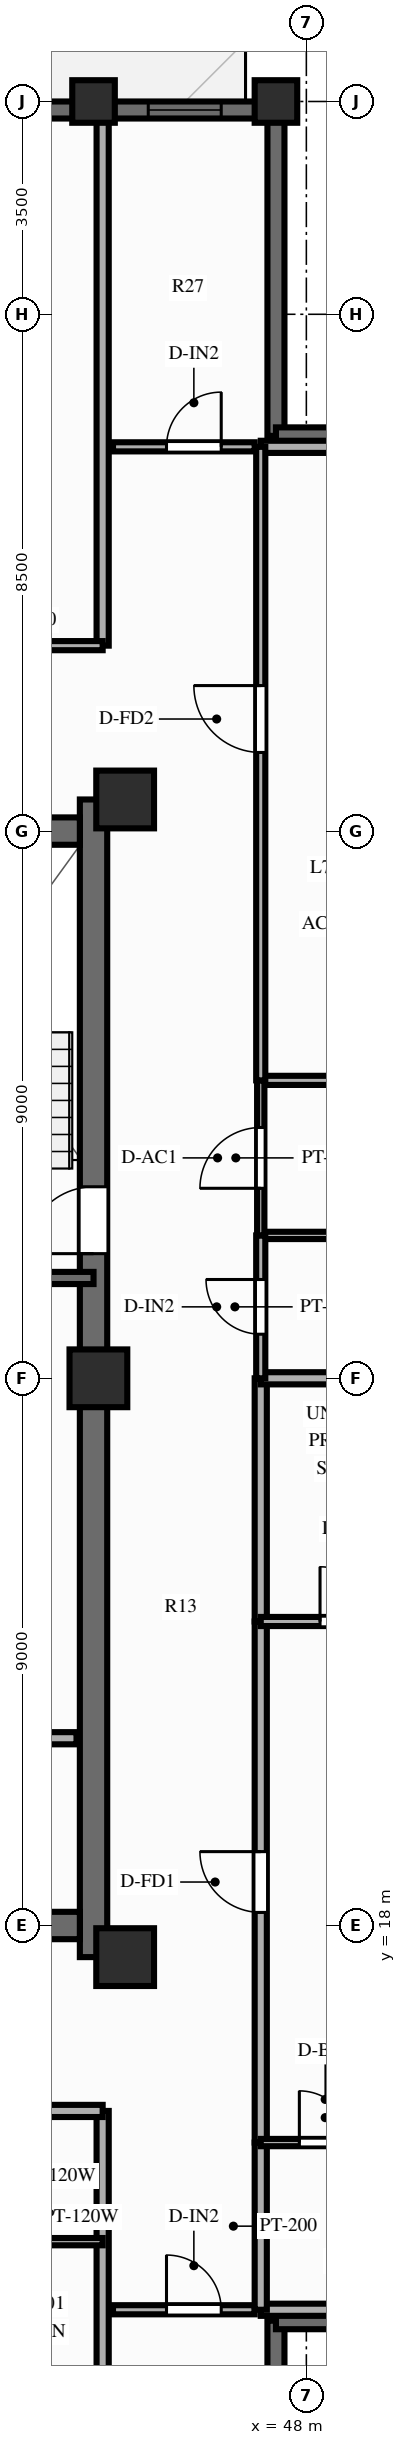
"""IFC4 building model, lengths in metres.
Left out: names, types, materials, properties, quantities, classifications, styles, units other than length and angle.
Written with IfcOpenShell. Run it as: python <this file> out.ifc"""

import sys

from ifc_helpers import new_model, si_unit, direction, frame, frame_2d, origin, origin_2d, place, context, subcontext, project, spatial, rectangle, extrude, source, transform, mapped, element, fill, save


model = new_model("IFC4")
c1 = context("Model", 3, precision=1e-05, world=origin(), true_north=direction((0.0, 1.0)))
c2 = subcontext(c1, "Body", "Model", "MODEL_VIEW")
j1 = project(units=[si_unit("LENGTHUNIT", "METRE"), si_unit("PLANEANGLEUNIT", "RADIAN")], contexts=[c1])
p1 = place(None, origin())
s1 = spatial("IfcSite", under=j1, at=p1, CompositionType="ELEMENT")
p2 = place(p1, origin())
s2 = spatial("IfcBuilding", under=s1, at=p2, CompositionType="ELEMENT")
p3 = place(p2, frame((0.0, 0.0, 240.0)))
s3 = spatial("IfcBuildingStorey", under=s2, at=p3, CompositionType="ELEMENT", Elevation=240.0)
p4 = place(p3, frame((44.5, 17.48, 0.0), z_axis=(0.0, 0.0, 1.0), x_axis=(0.0, 1.0, 0.0)))
e1 = element("IfcWall", 1, at=p4, inside=s3, PredefinedType="SHEAR", context=c2, shape_type="SweptSolid", body=[
    extrude(rectangle(XDim=19.04, YDim=0.45, at=frame_2d((9.52, 0.0))), origin(), (0.0, 0.0, 1.0), 3.0),
])
p5 = place(p4, frame((12.67, 0.0, 0.0), z_axis=(0.0, 0.0, 1.0), x_axis=(-1.0, 0.0, 0.0)))
e2 = element("IfcOpeningElement", 2, at=p5, cuts=e1, PredefinedType="OPENING", context=c2, shape_type="SweptSolid", body=[
    extrude(rectangle(XDim=1.1, YDim=2.15, at=frame_2d((0.55, 1.075))), frame((0.0, 0.237, 0.0), z_axis=(0.0, -1.0, 0.0), x_axis=(1.0, 0.0, 0.0)), (0.0, 0.0, 1.0), 0.474),
])
p6 = place(p3, frame((31.725, 18.0, 0.0), z_axis=(0.0, 0.0, 1.0), x_axis=(1.0, 0.0, 0.0)))
e3 = element("IfcWall", 3, at=p6, inside=s3, PredefinedType="SHEAR", context=c2, shape_type="SweptSolid", body=[
    extrude(rectangle(XDim=12.55, YDim=0.45, at=frame_2d((6.275, 0.0))), origin(), (0.0, 0.0, 1.0), 3.0),
])
p7 = place(p3, frame((31.725, 36.0, 0.0), z_axis=(0.0, 0.0, 1.0), x_axis=(1.0, 0.0, 0.0)))
e4 = element("IfcWall", 4, at=p7, inside=s3, PredefinedType="SHEAR", context=c2, shape_type="SweptSolid", body=[
    extrude(rectangle(XDim=12.55, YDim=0.45, at=frame_2d((6.275, 0.0))), origin(), (0.0, 0.0, 1.0), 3.0),
])
p8 = place(p7, frame((5.225, 0.0, 0.0), z_axis=(0.0, 0.0, 1.0), x_axis=(-1.0, 0.0, 0.0)))
e5 = element("IfcOpeningElement", 5, at=p8, cuts=e4, PredefinedType="OPENING", context=c2, shape_type="SweptSolid", body=[
    extrude(rectangle(XDim=1.4, YDim=2.15, at=frame_2d((0.7, 1.075))), frame((0.0, 0.237, 0.0), z_axis=(0.0, -1.0, 0.0), x_axis=(1.0, 0.0, 0.0)), (0.0, 0.0, 1.0), 0.474),
])
m1 = source(origin(), c2, "Body", "SweptSolid", [
    extrude(rectangle(XDim=0.95, YDim=0.95, at=origin_2d()), origin(), (0.0, 0.0, 1.0), 3.0),
])
for number, where, z_axis, x_axis in (
    (6, (45.02, 17.48, 0.0), (0.0, 0.0, 1.0), (1.0, 0.0, 0.0)),
    (7, (45.02, 36.52, 0.0), (0.0, 0.0, 1.0), (1.0, 0.0, 0.0)),
    (8, (44.58, 27.0, 0.0), (0.0, 0.0, 1.0), (1.0, 0.0, 0.0)),
):
    element("IfcColumn", number, at=place(p3, frame(where, z_axis=z_axis, x_axis=x_axis)), inside=s3, PredefinedType="COLUMN", context=c2, shape_type="MappedRepresentation", body=[
        mapped(m1, transform((0.0, 0.0, 0.0), scale=1.0)),
    ])
m2 = source(origin(), c2, "Body", "SweptSolid", [
    extrude(rectangle(XDim=0.7, YDim=0.7, at=origin_2d()), origin(), (0.0, 0.0, 1.0), 3.0),
])
for number, where, z_axis, x_axis in (
    (9, (47.5, 48.0, 0.0), (0.0, 0.0, 1.0), (1.0, 0.0, 0.0)),
    (10, (44.5, 48.0, 0.0), (0.0, 0.0, 1.0), (1.0, 0.0, 0.0)),
):
    element("IfcColumn", number, at=place(p3, frame(where, z_axis=z_axis, x_axis=x_axis)), inside=s3, PredefinedType="COLUMN", context=c2, shape_type="MappedRepresentation", body=[
        mapped(m2, transform((0.0, 0.0, 0.0), scale=1.0)),
    ])
p9 = place(p3, frame((28.5, 47.86, 0.0), z_axis=(0.0, 0.0, 1.0), x_axis=(1.0, 0.0, 0.0)))
e11 = element("IfcWall", 11, at=p9, inside=s3, PredefinedType="SOLIDWALL", context=c2, shape_type="SweptSolid", body=[
    extrude(rectangle(XDim=19.0, YDim=0.28, at=frame_2d((9.5, 0.0))), origin(), (0.0, 0.0, 1.0), 2.28),
])
p10 = place(p9, frame((0.9, 0.0, 0.25)))
e12 = element("IfcOpeningElement", 12, at=p10, cuts=e11, PredefinedType="OPENING", context=c2, shape_type="SweptSolid", body=[
    extrude(rectangle(XDim=1.2, YDim=1.5, at=frame_2d((0.6, 0.75))), frame((0.0, 0.152, 0.0), z_axis=(0.0, -1.0, 0.0), x_axis=(1.0, 0.0, 0.0)), (0.0, 0.0, 1.0), 0.304),
])
p11 = place(p9, frame((3.62, 0.0, 0.25)))
e13 = element("IfcOpeningElement", 13, at=p11, cuts=e11, PredefinedType="OPENING", context=c2, shape_type="SweptSolid", body=[
    extrude(rectangle(XDim=0.95, YDim=1.5, at=frame_2d((0.475, 0.75))), frame((0.0, 0.152, 0.0), z_axis=(0.0, -1.0, 0.0), x_axis=(1.0, 0.0, 0.0)), (0.0, 0.0, 1.0), 0.304),
])
p12 = place(p9, frame((5.682, 0.0, 0.25)))
e14 = element("IfcOpeningElement", 14, at=p12, cuts=e11, PredefinedType="OPENING", context=c2, shape_type="SweptSolid", body=[
    extrude(rectangle(XDim=1.2, YDim=1.5, at=frame_2d((0.6, 0.75))), frame((0.0, 0.152, 0.0), z_axis=(0.0, -1.0, 0.0), x_axis=(1.0, 0.0, 0.0)), (0.0, 0.0, 1.0), 0.304),
])
p13 = place(p9, frame((8.47, 0.0, 0.25)))
e15 = element("IfcOpeningElement", 15, at=p13, cuts=e11, PredefinedType="OPENING", context=c2, shape_type="SweptSolid", body=[
    extrude(rectangle(XDim=1.2, YDim=1.5, at=frame_2d((0.6, 0.75))), frame((0.0, 0.152, 0.0), z_axis=(0.0, -1.0, 0.0), x_axis=(1.0, 0.0, 0.0)), (0.0, 0.0, 1.0), 0.304),
])
p14 = place(p9, frame((12.643, 0.0, 0.0)))
e16 = element("IfcOpeningElement", 16, at=p14, cuts=e11, PredefinedType="OPENING", context=c2, shape_type="SweptSolid", body=[
    extrude(rectangle(XDim=1.1, YDim=2.15, at=frame_2d((0.55, 1.075))), frame((0.0, 0.152, 0.0), z_axis=(0.0, -1.0, 0.0), x_axis=(1.0, 0.0, 0.0)), (0.0, 0.0, 1.0), 0.304),
])
p15 = place(p9, frame((16.9, 0.0, 0.25)))
e17 = element("IfcOpeningElement", 17, at=p15, cuts=e11, PredefinedType="OPENING", context=c2, shape_type="SweptSolid", body=[
    extrude(rectangle(XDim=1.2, YDim=1.5, at=frame_2d((0.6, 0.75))), frame((0.0, 0.152, 0.0), z_axis=(0.0, -1.0, 0.0), x_axis=(1.0, 0.0, 0.0)), (0.0, 0.0, 1.0), 0.304),
])
for number, where, z_axis, x_axis in (
    (18, (47.5, 6.08, 0.0), (0.0, 0.0, 1.0), (0.0, 1.0, 0.0)),
    (19, (47.5, 11.5, 0.0), (0.0, 0.0, 1.0), (1.0, 0.0, 0.0)),
    (20, (47.5, 42.5, 0.0), (0.0, 0.0, 1.0), (0.0, 1.0, 0.0)),
    (21, (47.5, 42.5, 0.0), (0.0, 0.0, 1.0), (1.0, 0.0, 0.0)),
):
    element("IfcWall", number, at=place(p3, frame(where, z_axis=z_axis, x_axis=x_axis)), inside=s3, PredefinedType="SOLIDWALL", context=c2, shape_type="SweptSolid", body=[
        extrude(rectangle(XDim=5.42, YDim=0.28, at=frame_2d((2.71, 0.0))), origin(), (0.0, 0.0, 1.0), 2.28),
    ])
p16 = place(p3, frame((42.88, 21.08, 0.0), z_axis=(0.0, 0.0, 1.0), x_axis=(1.0, 0.0, 0.0)))
e22 = element("IfcWall", 22, at=p16, inside=s3, PredefinedType="PARTITIONING", context=c2, shape_type="SweptSolid", body=[
    extrude(rectangle(XDim=1.34, YDim=0.2, at=frame_2d((0.67, 0.0))), origin(), (0.0, 0.0, 1.0), 2.79),
])
p17 = place(p3, frame((40.57, 28.65, 0.0), z_axis=(0.0, 0.0, 1.0), x_axis=(1.0, 0.0, 0.0)))
e23 = element("IfcWall", 23, at=p17, inside=s3, PredefinedType="SOLIDWALL", context=c2, shape_type="SweptSolid", body=[
    extrude(rectangle(XDim=3.93, YDim=0.2, at=frame_2d((1.965, 0.0))), origin(), (0.0, 0.0, 1.0), 2.79),
])
p18 = place(p3, frame((44.82, 11.68, 0.0), z_axis=(0.0, 0.0, 1.0), x_axis=(1.0, 0.0, 0.0)))
e24 = element("IfcWall", 24, at=p18, inside=s3, PredefinedType="PARTITIONING", context=c2, shape_type="SweptSolid", body=[
    extrude(rectangle(XDim=2.33, YDim=0.15, at=frame_2d((1.165, 0.0))), origin(), (0.0, 0.0, 1.0), 2.79),
])
p19 = place(p18, frame((0.88, 0.0, 0.0)))
e25 = element("IfcOpeningElement", 25, at=p19, cuts=e24, PredefinedType="OPENING", context=c2, shape_type="SweptSolid", body=[
    extrude(rectangle(XDim=0.9, YDim=2.1, at=frame_2d((0.45, 1.05))), frame((0.0, 0.087, 0.0), z_axis=(0.0, -1.0, 0.0), x_axis=(1.0, 0.0, 0.0)), (0.0, 0.0, 1.0), 0.174),
])
p20 = place(p3, frame((44.82, 42.32, 0.0), z_axis=(0.0, 0.0, 1.0), x_axis=(1.0, 0.0, 0.0)))
e26 = element("IfcWall", 26, at=p20, inside=s3, PredefinedType="PARTITIONING", context=c2, shape_type="SweptSolid", body=[
    extrude(rectangle(XDim=2.33, YDim=0.15, at=frame_2d((1.165, 0.0))), origin(), (0.0, 0.0, 1.0), 2.79),
])
p21 = place(p20, frame((0.88, 0.0, 0.0)))
e27 = element("IfcOpeningElement", 27, at=p21, cuts=e26, PredefinedType="OPENING", context=c2, shape_type="SweptSolid", body=[
    extrude(rectangle(XDim=0.9, YDim=2.1, at=frame_2d((0.45, 1.05))), frame((0.0, 0.087, 0.0), z_axis=(0.0, -1.0, 0.0), x_axis=(1.0, 0.0, 0.0)), (0.0, 0.0, 1.0), 0.174),
])
p22 = place(p3, frame((44.65, 14.95, 0.0), z_axis=(0.0, 0.0, 1.0), x_axis=(0.0, -1.0, 0.0)))
e28 = element("IfcWall", 28, at=p22, inside=s3, PredefinedType="PARTITIONING", context=c2, shape_type="SweptSolid", body=[
    extrude(rectangle(XDim=8.8, YDim=0.2, at=frame_2d((4.4, 0.0))), origin(), (0.0, 0.0, 1.0), 2.39),
])
p23 = place(p3, frame((41.8, 14.95, 0.0), z_axis=(0.0, 0.0, 1.0), x_axis=(1.0, 0.0, 0.0)))
e29 = element("IfcWall", 29, at=p23, inside=s3, PredefinedType="PARTITIONING", context=c2, shape_type="SweptSolid", body=[
    extrude(rectangle(XDim=2.85, YDim=0.2, at=frame_2d((1.425, 0.0))), origin(), (0.0, 0.0, 1.0), 2.79),
])
p24 = place(p3, frame((41.8, 12.8, 0.0), z_axis=(0.0, 0.0, 1.0), x_axis=(1.0, 0.0, 0.0)))
e30 = element("IfcWall", 30, at=p24, inside=s3, PredefinedType="PARTITIONING", context=c2, shape_type="SweptSolid", body=[
    extrude(rectangle(XDim=2.85, YDim=0.12, at=frame_2d((1.425, 0.0))), origin(), (0.0, 0.0, 1.0), 2.79),
])
p25 = place(p3, frame((44.65, 39.05, 0.0), z_axis=(0.0, 0.0, 1.0), x_axis=(0.0, 1.0, 0.0)))
e31 = element("IfcWall", 31, at=p25, inside=s3, PredefinedType="PARTITIONING", context=c2, shape_type="SweptSolid", body=[
    extrude(rectangle(XDim=8.8, YDim=0.2, at=frame_2d((4.4, 0.0))), origin(), (0.0, 0.0, 1.0), 2.39),
])
p26 = place(p3, frame((39.075, 39.05, 0.0), z_axis=(0.0, 0.0, 1.0), x_axis=(1.0, 0.0, 0.0)))
e32 = element("IfcWall", 32, at=p26, inside=s3, PredefinedType="PARTITIONING", context=c2, shape_type="SweptSolid", body=[
    extrude(rectangle(XDim=5.575, YDim=0.15, at=frame_2d((2.788, 0.0))), origin(), (0.0, 0.0, 1.0), 2.79),
])
p27 = place(p26, frame((2.238, 0.0, 0.0)))
e33 = element("IfcOpeningElement", 33, at=p27, cuts=e32, PredefinedType="OPENING", context=c2, shape_type="SweptSolid", body=[
    extrude(rectangle(XDim=1.1, YDim=2.15, at=frame_2d((0.55, 1.075))), frame((0.0, 0.087, 0.0), z_axis=(0.0, -1.0, 0.0), x_axis=(1.0, 0.0, 0.0)), (0.0, 0.0, 1.0), 0.174),
])
for number, where, z_axis, x_axis in (
    (34, (47.25, 11.68, 0.0), (0.0, 0.0, 1.0), (1.0, 0.0, 0.0)),
    (35, (47.25, 42.32, 0.0), (0.0, 0.0, 1.0), (1.0, 0.0, 0.0)),
):
    element("IfcWall", number, at=place(p3, frame(where, z_axis=z_axis, x_axis=x_axis)), inside=s3, PredefinedType="PARTITIONING", context=c2, shape_type="SweptSolid", body=[
        extrude(rectangle(XDim=5.6, YDim=0.2, at=frame_2d((2.8, 0.0))), origin(), (0.0, 0.0, 1.0), 2.79),
    ])
p28 = place(p3, frame((47.25, 11.68, 0.0), z_axis=(0.0, 0.0, 1.0), x_axis=(0.0, 1.0, 0.0)))
e36 = element("IfcWall", 36, at=p28, inside=s3, PredefinedType="PARTITIONING", context=c2, shape_type="SweptSolid", body=[
    extrude(rectangle(XDim=2.75, YDim=0.2, at=frame_2d((1.375, 0.0))), origin(), (0.0, 0.0, 1.0), 2.79),
])
p29 = place(p3, frame((47.25, 14.43, 0.0), z_axis=(0.0, 0.0, 1.0), x_axis=(0.0, 1.0, 0.0)))
e37 = element("IfcWall", 37, at=p29, inside=s3, PredefinedType="PARTITIONING", context=c2, shape_type="SweptSolid", body=[
    extrude(rectangle(XDim=8.57, YDim=0.2, at=frame_2d((4.285, 0.0))), origin(), (0.0, 0.0, 1.0), 2.79),
])
p30 = place(p29, frame((3.785, 0.0, 0.0)))
e38 = element("IfcOpeningElement", 38, at=p30, cuts=e37, PredefinedType="OPENING", context=c2, shape_type="SweptSolid", body=[
    extrude(rectangle(XDim=1.0, YDim=2.15, at=frame_2d((0.5, 1.075))), frame((0.0, 0.112, 0.0), z_axis=(0.0, -1.0, 0.0), x_axis=(1.0, 0.0, 0.0)), (0.0, 0.0, 1.0), 0.224),
])
p31 = place(p3, frame((47.25, 23.0, 0.0), z_axis=(0.0, 0.0, 1.0), x_axis=(0.0, 1.0, 0.0)))
e39 = element("IfcWall", 39, at=p31, inside=s3, PredefinedType="PARTITIONING", context=c2, shape_type="SweptSolid", body=[
    extrude(rectangle(XDim=4.0, YDim=0.2, at=frame_2d((2.0, 0.0))), origin(), (0.0, 0.0, 1.0), 2.79),
])
p32 = place(p3, frame((47.25, 14.43, 0.0), z_axis=(0.0, 0.0, 1.0), x_axis=(1.0, 0.0, 0.0)))
e40 = element("IfcWall", 40, at=p32, inside=s3, PredefinedType="PARTITIONING", context=c2, shape_type="SweptSolid", body=[
    extrude(rectangle(XDim=2.12, YDim=0.12, at=frame_2d((1.06, 0.0))), origin(), (0.0, 0.0, 1.0), 2.79),
])
p33 = place(p32, frame((0.635, 0.0, 0.0)))
e41 = element("IfcOpeningElement", 41, at=p33, cuts=e40, PredefinedType="OPENING", context=c2, shape_type="SweptSolid", body=[
    extrude(rectangle(XDim=0.85, YDim=2.05, at=frame_2d((0.425, 1.025))), frame((0.0, 0.072, 0.0), z_axis=(0.0, -1.0, 0.0), x_axis=(1.0, 0.0, 0.0)), (0.0, 0.0, 1.0), 0.144),
])
p34 = place(p3, frame((47.25, 23.0, 0.0), z_axis=(0.0, 0.0, 1.0), x_axis=(1.0, 0.0, 0.0)))
e42 = element("IfcWall", 42, at=p34, inside=s3, PredefinedType="PARTITIONING", context=c2, shape_type="SweptSolid", body=[
    extrude(rectangle(XDim=2.85, YDim=0.15, at=frame_2d((1.425, 0.0))), origin(), (0.0, 0.0, 1.0), 2.79),
])
p35 = place(p34, frame((0.975, 0.0, 0.0)))
e43 = element("IfcOpeningElement", 43, at=p35, cuts=e42, PredefinedType="OPENING", context=c2, shape_type="SweptSolid", body=[
    extrude(rectangle(XDim=0.9, YDim=2.1, at=frame_2d((0.45, 1.05))), frame((0.0, 0.087, 0.0), z_axis=(0.0, -1.0, 0.0), x_axis=(1.0, 0.0, 0.0)), (0.0, 0.0, 1.0), 0.174),
])
p36 = place(p3, frame((47.25, 27.0, 0.0), z_axis=(0.0, 0.0, 1.0), x_axis=(1.0, 0.0, 0.0)))
e44 = element("IfcWall", 44, at=p36, inside=s3, PredefinedType="PARTITIONING", context=c2, shape_type="SweptSolid", body=[
    extrude(rectangle(XDim=5.6, YDim=0.2, at=frame_2d((2.8, 0.0))), origin(), (0.0, 0.0, 1.0), 2.79),
])
p37 = place(p3, frame((47.25, 29.35, 0.0), z_axis=(0.0, 0.0, 1.0), x_axis=(1.0, 0.0, 0.0)))
e45 = element("IfcWall", 45, at=p37, inside=s3, PredefinedType="PARTITIONING", context=c2, shape_type="SweptSolid", body=[
    extrude(rectangle(XDim=3.6, YDim=0.12, at=frame_2d((1.8, 0.0))), origin(), (0.0, 0.0, 1.0), 2.79),
])
p38 = place(p3, frame((47.25, 31.9, 0.0), z_axis=(0.0, 0.0, 1.0), x_axis=(1.0, 0.0, 0.0)))
e46 = element("IfcWall", 46, at=p38, inside=s3, PredefinedType="PARTITIONING", context=c2, shape_type="SweptSolid", body=[
    extrude(rectangle(XDim=3.6, YDim=0.15, at=frame_2d((1.8, 0.0))), origin(), (0.0, 0.0, 1.0), 2.39),
])
p39 = place(p3, frame((47.25, 27.0, 0.0), z_axis=(0.0, 0.0, 1.0), x_axis=(0.0, 1.0, 0.0)))
e47 = element("IfcWall", 47, at=p39, inside=s3, PredefinedType="PARTITIONING", context=c2, shape_type="SweptSolid", body=[
    extrude(rectangle(XDim=2.35, YDim=0.15, at=frame_2d((1.175, 0.0))), origin(), (0.0, 0.0, 1.0), 2.79),
])
p40 = place(p39, frame((0.725, 0.0, 0.0)))
e48 = element("IfcOpeningElement", 48, at=p40, cuts=e47, PredefinedType="OPENING", context=c2, shape_type="SweptSolid", body=[
    extrude(rectangle(XDim=0.9, YDim=2.1, at=frame_2d((0.45, 1.05))), frame((0.0, 0.087, 0.0), z_axis=(0.0, -1.0, 0.0), x_axis=(1.0, 0.0, 0.0)), (0.0, 0.0, 1.0), 0.174),
])
p41 = place(p3, frame((47.25, 29.35, 0.0), z_axis=(0.0, 0.0, 1.0), x_axis=(0.0, 1.0, 0.0)))
e49 = element("IfcWall", 49, at=p41, inside=s3, PredefinedType="PARTITIONING", context=c2, shape_type="SweptSolid", body=[
    extrude(rectangle(XDim=2.55, YDim=0.12, at=frame_2d((1.275, 0.0))), origin(), (0.0, 0.0, 1.0), 2.79),
])
p42 = place(p41, frame((0.775, 0.0, 0.0)))
e50 = element("IfcOpeningElement", 50, at=p42, cuts=e49, PredefinedType="OPENING", context=c2, shape_type="SweptSolid", body=[
    extrude(rectangle(XDim=1.0, YDim=2.1, at=frame_2d((0.5, 1.05))), frame((0.0, 0.072, 0.0), z_axis=(0.0, -1.0, 0.0), x_axis=(1.0, 0.0, 0.0)), (0.0, 0.0, 1.0), 0.144),
])
p43 = place(p3, frame((47.25, 31.9, 0.0), z_axis=(0.0, 0.0, 1.0), x_axis=(0.0, 1.0, 0.0)))
e51 = element("IfcWall", 51, at=p43, inside=s3, PredefinedType="PARTITIONING", context=c2, shape_type="SweptSolid", body=[
    extrude(rectangle(XDim=10.42, YDim=0.15, at=frame_2d((5.21, 0.0))), origin(), (0.0, 0.0, 1.0), 2.79),
])
p44 = place(p43, frame((5.393, 0.0, 0.0)))
e52 = element("IfcOpeningElement", 52, at=p44, cuts=e51, PredefinedType="OPENING", context=c2, shape_type="SweptSolid", body=[
    extrude(rectangle(XDim=1.1, YDim=2.15, at=frame_2d((0.55, 1.075))), frame((0.0, 0.087, 0.0), z_axis=(0.0, -1.0, 0.0), x_axis=(1.0, 0.0, 0.0)), (0.0, 0.0, 1.0), 0.174),
])
m3 = source(origin(), c2, "Body", "SweptSolid", [
    extrude(rectangle(XDim=1.2, YDim=1.5, at=frame_2d((0.6, 0.75))), frame((0.0, 0.03, 0.0), z_axis=(0.0, -1.0, 0.0), x_axis=(1.0, 0.0, 0.0)), (0.0, 0.0, 1.0), 0.06),
])
p45 = place(p15, origin())
e53 = element("IfcWindow", 53, at=p45, inside=s3, PartitioningType="SINGLE_PANEL", PredefinedType="WINDOW", context=c2, shape_type="MappedRepresentation", body=[
    mapped(m3, transform((0.0, 0.0, 0.0), scale=1.0)),
])
fill(e17, e53)
m4 = source(origin(), c2, "Body", "SweptSolid", [
    extrude(rectangle(XDim=1.1, YDim=2.15, at=frame_2d((0.55, 1.075))), frame((0.0, 0.025, 0.0), z_axis=(0.0, -1.0, 0.0), x_axis=(1.0, 0.0, 0.0)), (0.0, 0.0, 1.0), 0.05),
])
p46 = place(p5, origin())
e54 = element("IfcDoor", 54, at=p46, inside=s3, OperationType="SINGLE_SWING_RIGHT", PredefinedType="DOOR", context=c2, shape_type="MappedRepresentation", body=[
    mapped(m4, transform((0.0, 0.0, 0.0), scale=1.0)),
])
fill(e2, e54)
m5 = source(origin(), c2, "Body", "SweptSolid", [
    extrude(rectangle(XDim=0.9, YDim=2.1, at=frame_2d((0.45, 1.05))), frame((0.0, 0.025, 0.0), z_axis=(0.0, -1.0, 0.0), x_axis=(1.0, 0.0, 0.0)), (0.0, 0.0, 1.0), 0.05),
])
p47 = place(p19, origin())
e55 = element("IfcDoor", 55, at=p47, inside=s3, OperationType="SINGLE_SWING_LEFT", PredefinedType="DOOR", context=c2, shape_type="MappedRepresentation", body=[
    mapped(m5, transform((0.0, 0.0, 0.0), scale=1.0)),
])
fill(e25, e55)
p48 = place(p21, origin())
e56 = element("IfcDoor", 56, at=p48, inside=s3, OperationType="SINGLE_SWING_RIGHT", PredefinedType="DOOR", context=c2, shape_type="MappedRepresentation", body=[
    mapped(m5, transform((0.0, 0.0, 0.0), scale=1.0)),
])
fill(e27, e56)
m6 = source(origin(), c2, "Body", "SweptSolid", [
    extrude(rectangle(XDim=1.0, YDim=2.15, at=frame_2d((0.5, 1.075))), frame((0.0, 0.025, 0.0), z_axis=(0.0, -1.0, 0.0), x_axis=(1.0, 0.0, 0.0)), (0.0, 0.0, 1.0), 0.05),
])
p49 = place(p30, origin())
e57 = element("IfcDoor", 57, at=p49, inside=s3, OperationType="SINGLE_SWING_RIGHT", PredefinedType="DOOR", context=c2, shape_type="MappedRepresentation", body=[
    mapped(m6, transform((0.0, 0.0, 0.0), scale=1.0)),
])
fill(e38, e57)
m7 = source(origin(), c2, "Body", "SweptSolid", [
    extrude(rectangle(XDim=0.85, YDim=2.05, at=frame_2d((0.425, 1.025))), frame((0.0, 0.025, 0.0), z_axis=(0.0, -1.0, 0.0), x_axis=(1.0, 0.0, 0.0)), (0.0, 0.0, 1.0), 0.05),
])
p50 = place(p33, origin())
e58 = element("IfcDoor", 58, at=p50, inside=s3, OperationType="SINGLE_SWING_LEFT", PredefinedType="DOOR", context=c2, shape_type="MappedRepresentation", body=[
    mapped(m7, transform((0.0, 0.0, 0.0), scale=1.0)),
])
fill(e41, e58)
p51 = place(p35, origin())
e59 = element("IfcDoor", 59, at=p51, inside=s3, OperationType="SINGLE_SWING_LEFT", PredefinedType="DOOR", context=c2, shape_type="MappedRepresentation", body=[
    mapped(m5, transform((0.0, 0.0, 0.0), scale=1.0)),
])
fill(e43, e59)
p52 = place(p40, origin())
e60 = element("IfcDoor", 60, at=p52, inside=s3, OperationType="SINGLE_SWING_RIGHT", PredefinedType="DOOR", context=c2, shape_type="MappedRepresentation", body=[
    mapped(m5, transform((0.0, 0.0, 0.0), scale=1.0)),
])
fill(e48, e60)
m8 = source(origin(), c2, "Body", "SweptSolid", [
    extrude(rectangle(XDim=1.0, YDim=2.1, at=frame_2d((0.5, 1.05))), frame((0.0, 0.025, 0.0), z_axis=(0.0, -1.0, 0.0), x_axis=(1.0, 0.0, 0.0)), (0.0, 0.0, 1.0), 0.05),
])
p53 = place(p42, origin())
e61 = element("IfcDoor", 61, at=p53, inside=s3, OperationType="SINGLE_SWING_LEFT", PredefinedType="DOOR", context=c2, shape_type="MappedRepresentation", body=[
    mapped(m8, transform((0.0, 0.0, 0.0), scale=1.0)),
])
fill(e50, e61)
p54 = place(p44, origin())
e62 = element("IfcDoor", 62, at=p54, inside=s3, OperationType="SINGLE_SWING_RIGHT", PredefinedType="DOOR", context=c2, shape_type="MappedRepresentation", body=[
    mapped(m4, transform((0.0, 0.0, 0.0), scale=1.0)),
])
fill(e52, e62)
save(model, sys.argv[1])
